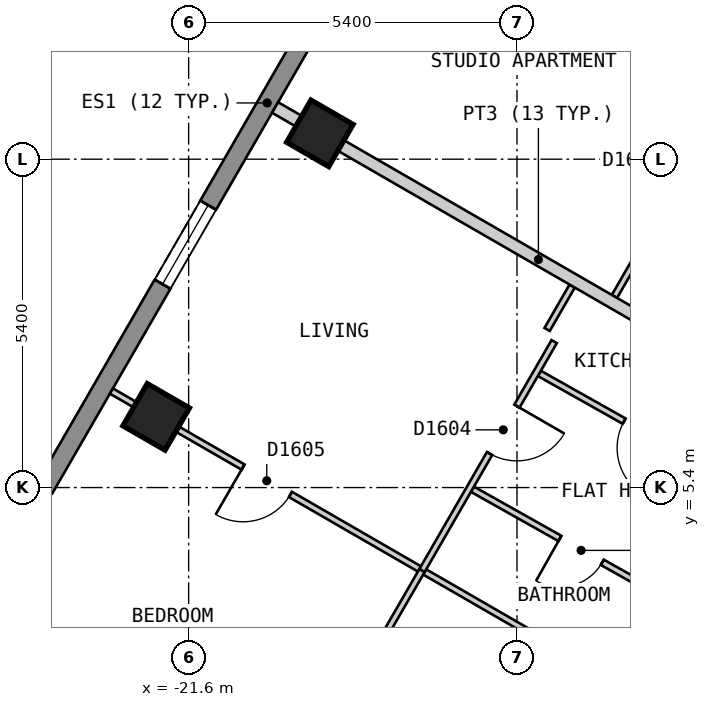
"""IFC4 building model, lengths in metres.
Left out: names, types, materials, properties, quantities, classifications, styles, units other than length and angle.
Written with IfcOpenShell. Run it as: python <this file> out.ifc"""

import sys

from ifc_helpers import new_model, si_unit, direction, frame, frame_2d, origin, origin_2d, place, context, subcontext, project, spatial, polyline, rectangle, outline, extrude, element, fill, save


model = new_model("IFC4")
c1 = context("Model", 3, precision=1e-05, world=origin(), true_north=direction((0.0, 1.0)))
c2 = subcontext(c1, "Body", "Model", "MODEL_VIEW")
j1 = project(units=[si_unit("LENGTHUNIT", "METRE"), si_unit("PLANEANGLEUNIT", "RADIAN")], contexts=[c1])
p1 = place(None, origin())
s1 = spatial("IfcSite", under=j1, at=p1, CompositionType="ELEMENT")
p2 = place(p1, origin())
s2 = spatial("IfcBuilding", under=s1, at=p2, CompositionType="ELEMENT")
p3 = place(p2, frame((0.0, 0.0, 169.2)))
s3 = spatial("IfcBuildingStorey", under=s2, at=p3, CompositionType="ELEMENT", Elevation=169.2)
for number, where, z_axis, x_axis in (
    (1, (-19.442, 11.225, 0.0), (0.0, 0.0, 1.0), (-0.5, -0.866, 0.0)),
    (2, (-22.134, 6.562, 0.0), (0.0, 0.0, 1.0), (-0.5, -0.866, 0.0)),
):
    element("IfcColumn", number, at=place(p3, frame(where, z_axis=z_axis, x_axis=x_axis)), inside=s3, PredefinedType="COLUMN", context=c2, shape_type="SweptSolid", body=[
        extrude(rectangle(XDim=0.8, YDim=0.8, at=origin_2d()), origin(), (0.0, 0.0, 1.0), 3.0),
    ])
p4 = place(p3, frame((-14.592, 21.625, 0.0), z_axis=(0.0, 0.0, 1.0), x_axis=(-0.500010537973, -0.866019319597, 0.0)))
e3 = element("IfcWall", 3, at=p4, inside=s3, PredefinedType="SOLIDWALL", context=c2, shape_type="SweptSolid", body=[
    extrude(outline(polyline([(0.0, -0.15), (22.863, -0.15), (22.783, 0.15), (0.08, 0.15), (0.0, -0.15)])), origin(), (0.0, 0.0, 1.0), 2.7),
])
p5 = place(p4, frame((2.606, 0.0, 0.15)))
e4 = element("IfcOpeningElement", 4, at=p5, cuts=e3, PredefinedType="OPENING", context=c2, shape_type="SweptSolid", body=[
    extrude(rectangle(XDim=1.5, YDim=2.1, at=frame_2d((0.75, 1.05))), frame((0.0, 0.16, 0.0), z_axis=(0.0, -1.0, 0.0), x_axis=(1.0, 0.0, 0.0)), (0.0, 0.0, 1.0), 0.32),
])
p6 = place(p4, frame((7.99, 0.0, 0.15)))
e5 = element("IfcOpeningElement", 5, at=p6, cuts=e3, PredefinedType="OPENING", context=c2, shape_type="SweptSolid", body=[
    extrude(rectangle(XDim=1.5, YDim=2.1, at=frame_2d((0.75, 1.05))), frame((0.0, 0.16, 0.0), z_axis=(0.0, -1.0, 0.0), x_axis=(1.0, 0.0, 0.0)), (0.0, 0.0, 1.0), 0.32),
])
p7 = place(p4, frame((13.373, 0.0, 0.15)))
e6 = element("IfcOpeningElement", 6, at=p7, cuts=e3, PredefinedType="OPENING", context=c2, shape_type="SweptSolid", body=[
    extrude(rectangle(XDim=1.5, YDim=2.1, at=frame_2d((0.75, 1.05))), frame((0.0, 0.16, 0.0), z_axis=(0.0, -1.0, 0.0), x_axis=(1.0, 0.0, 0.0)), (0.0, 0.0, 1.0), 0.32),
])
p8 = place(p4, frame((18.758, 0.0, 0.15)))
e7 = element("IfcOpeningElement", 7, at=p8, cuts=e3, PredefinedType="OPENING", context=c2, shape_type="SweptSolid", body=[
    extrude(rectangle(XDim=1.5, YDim=2.1, at=frame_2d((0.75, 1.05))), frame((0.0, 0.16, 0.0), z_axis=(0.0, -1.0, 0.0), x_axis=(1.0, 0.0, 0.0)), (0.0, 0.0, 1.0), 0.32),
])
p9 = place(p3, frame((-15.53, -0.501, 0.0), z_axis=(0.0, 0.0, 1.0), x_axis=(0.499952498232, 0.866052827206, 0.0)))
e8 = element("IfcWall", 8, at=p9, inside=s3, PredefinedType="PARTITIONING", context=c2, shape_type="SweptSolid", body=[
    extrude(rectangle(XDim=9.585, YDim=0.2, at=frame_2d((4.792, 0.0))), origin(), (0.0, 0.0, 1.0), 2.7),
])
p10 = place(p9, frame((5.031, 0.0, 0.0)))
e9 = element("IfcOpeningElement", 9, at=p10, cuts=e8, PredefinedType="OPENING", context=c2, shape_type="SweptSolid", body=[
    extrude(rectangle(XDim=1.0, YDim=2.1, at=frame_2d((0.5, 1.05))), frame((0.0, 0.11, 0.0), z_axis=(0.0, -1.0, 0.0), x_axis=(1.0, 0.0, 0.0)), (0.0, 0.0, 1.0), 0.22),
])
p11 = place(p3, frame((-16.932, 5.372, 0.0), z_axis=(0.0, 0.0, 1.0), x_axis=(0.871514356952, -0.490369988505, 0.0)))
e10 = element("IfcWall", 10, at=p11, inside=s3, PredefinedType="PARTITIONING", context=c2, shape_type="SweptSolid", body=[
    extrude(rectangle(XDim=4.05, YDim=0.1, at=frame_2d((2.025, 0.0))), origin(), (0.0, 0.0, 1.0), 2.7),
])
p12 = place(p11, frame((1.65, 0.0, 0.0)))
e11 = element("IfcOpeningElement", 11, at=p12, cuts=e10, PredefinedType="OPENING", context=c2, shape_type="SweptSolid", body=[
    extrude(rectangle(XDim=0.8, YDim=2.1, at=frame_2d((0.4, 1.05))), frame((0.0, 0.06, 0.0), z_axis=(0.0, -1.0, 0.0), x_axis=(1.0, 0.0, 0.0)), (0.0, 0.0, 1.0), 0.12),
])
p13 = place(p3, frame((-15.832, 7.277, 0.0), z_axis=(0.0, 0.0, 1.0), x_axis=(0.871528850672, -0.490344228523, 0.0)))
e12 = element("IfcWall", 12, at=p13, inside=s3, PredefinedType="PARTITIONING", context=c2, shape_type="SweptSolid", body=[
    extrude(rectangle(XDim=4.05, YDim=0.1, at=frame_2d((2.025, 0.0))), origin(), (0.0, 0.0, 1.0), 2.7),
])
p14 = place(p13, frame((1.6, 0.0, 0.0)))
e13 = element("IfcOpeningElement", 13, at=p14, cuts=e12, PredefinedType="OPENING", context=c2, shape_type="SweptSolid", body=[
    extrude(rectangle(XDim=0.9, YDim=2.1, at=frame_2d((0.45, 1.05))), frame((0.0, 0.06, 0.0), z_axis=(0.0, -1.0, 0.0), x_axis=(1.0, 0.0, 0.0)), (0.0, 0.0, 1.0), 0.12),
])
p15 = place(p3, frame((-22.87, 6.987, 0.0), z_axis=(0.0, 0.0, 1.0), x_axis=(0.866022959057, -0.500004234368, 0.0)))
e14 = element("IfcWall", 14, at=p15, inside=s3, PredefinedType="PARTITIONING", context=c2, shape_type="SweptSolid", body=[
    extrude(rectangle(XDim=10.0, YDim=0.1, at=frame_2d((5.0, 0.0))), origin(), (0.0, 0.0, 1.0), 2.7),
])
p16 = place(p15, frame((2.5, 0.0, 0.0)))
e15 = element("IfcOpeningElement", 15, at=p16, cuts=e14, PredefinedType="OPENING", context=c2, shape_type="SweptSolid", body=[
    extrude(rectangle(XDim=0.9, YDim=2.1, at=frame_2d((0.45, 1.05))), frame((0.0, 0.06, 0.0), z_axis=(0.0, -1.0, 0.0), x_axis=(1.0, 0.0, 0.0)), (0.0, 0.0, 1.0), 0.12),
])
p17 = place(p3, frame((-14.597, 8.543, 0.0), z_axis=(0.0, 0.0, 1.0), x_axis=(0.499962957901, 0.866046788994, 0.0)))
e16 = element("IfcWall", 16, at=p17, inside=s3, PredefinedType="PARTITIONING", context=c2, shape_type="SweptSolid", body=[
    extrude(rectangle(XDim=5.185, YDim=0.1, at=frame_2d((2.592, 0.0))), origin(), (0.0, 0.0, 1.0), 2.7),
])
p18 = place(p17, frame((2.113, 0.0, 0.0)))
e17 = element("IfcOpeningElement", 17, at=p18, cuts=e16, PredefinedType="OPENING", context=c2, shape_type="SweptSolid", body=[
    extrude(rectangle(XDim=0.9, YDim=2.1, at=frame_2d((0.45, 1.05))), frame((0.0, 0.06, 0.0), z_axis=(0.0, -1.0, 0.0), x_axis=(1.0, 0.0, 0.0)), (0.0, 0.0, 1.0), 0.12),
])
p19 = place(p3, frame((-19.283, 1.4, 0.0), z_axis=(0.0, 0.0, 1.0), x_axis=(0.499847391584, 0.866113494368, 0.0)))
e18 = element("IfcWall", 18, at=p19, inside=s3, PredefinedType="PARTITIONING", context=c2, shape_type="SweptSolid", body=[
    extrude(rectangle(XDim=3.045, YDim=0.1, at=frame_2d((1.522, 0.0))), origin(), (0.0, 0.0, 1.0), 2.7),
])
p20 = place(p19, frame((1.123, 0.0, 0.0)))
e19 = element("IfcOpeningElement", 19, at=p20, cuts=e18, PredefinedType="OPENING", context=c2, shape_type="SweptSolid", body=[
    extrude(rectangle(XDim=0.8, YDim=2.1, at=frame_2d((0.4, 1.05))), frame((0.0, 0.06, 0.0), z_axis=(0.0, -1.0, 0.0), x_axis=(1.0, 0.0, 0.0)), (0.0, 0.0, 1.0), 0.12),
])
p21 = place(p3, frame((-15.704, 8.0, 0.0), z_axis=(0.0, 0.0, 1.0), x_axis=(0.499833531678, 0.866121492985, 0.0)))
e20 = element("IfcWall", 20, at=p21, inside=s3, PredefinedType="PARTITIONING", context=c2, shape_type="SweptSolid", body=[
    extrude(rectangle(XDim=0.824, YDim=0.1, at=frame_2d((0.412, 0.0))), origin(), (0.0, 0.0, 1.0), 2.7),
])
p22 = place(p3, frame((-20.178, 11.65, 0.0), z_axis=(0.0, 0.0, 1.0), x_axis=(0.866016855193, -0.500014806302, 0.0)))
e21 = element("IfcWall", 21, at=p22, inside=s3, PredefinedType="PARTITIONING", context=c2, shape_type="SweptSolid", body=[
    extrude(rectangle(XDim=10.0, YDim=0.2, at=frame_2d((5.0, 0.0))), origin(), (0.0, 0.0, 1.0), 2.7),
])
p23 = place(p3, frame((-17.761, 4.037, 0.0), z_axis=(0.0, 0.0, 1.0), x_axis=(0.50009692756, 0.865969435399, 0.0)))
e22 = element("IfcWall", 22, at=p23, inside=s3, PredefinedType="PARTITIONING", context=c2, shape_type="SweptSolid", body=[
    extrude(rectangle(XDim=4.345, YDim=0.1, at=frame_2d((2.173, 0.0))), origin(), (0.0, 0.0, 1.0), 2.7),
])
p24 = place(p23, frame((2.22, 0.0, 0.0)))
e23 = element("IfcOpeningElement", 23, at=p24, cuts=e22, PredefinedType="OPENING", context=c2, shape_type="SweptSolid", body=[
    extrude(rectangle(XDim=0.9, YDim=2.1, at=frame_2d((0.45, 1.05))), frame((0.0, 0.06, 0.0), z_axis=(0.0, -1.0, 0.0), x_axis=(1.0, 0.0, 0.0)), (0.0, 0.0, 1.0), 0.12),
])
p25 = place(p7, origin())
e24 = element("IfcWindow", 24, at=p25, inside=s3, PartitioningType="SINGLE_PANEL", PredefinedType="WINDOW", context=c2, shape_type="SweptSolid", body=[
    extrude(rectangle(XDim=1.5, YDim=2.1, at=frame_2d((0.75, 1.05))), frame((0.0, 0.03, 0.0), z_axis=(0.0, -1.0, 0.0), x_axis=(1.0, 0.0, 0.0)), (0.0, 0.0, 1.0), 0.06),
])
fill(e6, e24)
p26 = place(p14, origin())
e25 = element("IfcDoor", 25, at=p26, inside=s3, OperationType="SINGLE_SWING_RIGHT", PredefinedType="DOOR", context=c2, shape_type="SweptSolid", body=[
    extrude(rectangle(XDim=0.9, YDim=2.1, at=frame_2d((0.45, 1.05))), frame((0.0, 0.025, 0.0), z_axis=(0.0, -1.0, 0.0), x_axis=(1.0, 0.0, 0.0)), (0.0, 0.0, 1.0), 0.05),
])
fill(e13, e25)
p27 = place(p12, origin())
e26 = element("IfcDoor", 26, at=p27, inside=s3, OperationType="SINGLE_SWING_LEFT", PredefinedType="DOOR", context=c2, shape_type="SweptSolid", body=[
    extrude(rectangle(XDim=0.8, YDim=2.1, at=frame_2d((0.4, 1.05))), frame((0.0, 0.025, 0.0), z_axis=(0.0, -1.0, 0.0), x_axis=(1.0, 0.0, 0.0)), (0.0, 0.0, 1.0), 0.05),
])
fill(e11, e26)
p28 = place(p24, origin())
e27 = element("IfcDoor", 27, at=p28, inside=s3, OperationType="SINGLE_SWING_RIGHT", PredefinedType="DOOR", context=c2, shape_type="SweptSolid", body=[
    extrude(rectangle(XDim=0.9, YDim=2.1, at=frame_2d((0.45, 1.05))), frame((0.0, 0.025, 0.0), z_axis=(0.0, -1.0, 0.0), x_axis=(1.0, 0.0, 0.0)), (0.0, 0.0, 1.0), 0.05),
])
fill(e23, e27)
p29 = place(p16, origin())
e28 = element("IfcDoor", 28, at=p29, inside=s3, OperationType="SINGLE_SWING_LEFT", PredefinedType="DOOR", context=c2, shape_type="SweptSolid", body=[
    extrude(rectangle(XDim=0.9, YDim=2.1, at=frame_2d((0.45, 1.05))), frame((0.0, 0.025, 0.0), z_axis=(0.0, -1.0, 0.0), x_axis=(1.0, 0.0, 0.0)), (0.0, 0.0, 1.0), 0.05),
])
fill(e15, e28)
save(model, sys.argv[1])
